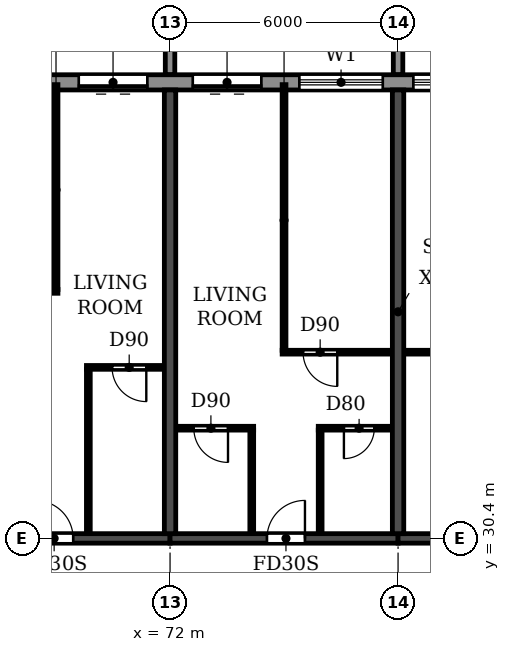
"""IFC4 building model, lengths in metres.
Left out: names, types, materials, properties, quantities, classifications, styles, units other than length and angle.
Written with IfcOpenShell. Run it as: python <this file> out.ifc"""

import sys

from ifc_helpers import new_model, si_unit, direction, frame, frame_2d, origin, place, context, subcontext, project, spatial, polyline, rectangle, outline, extrude, source, transform, mapped, element, fill, save


model = new_model("IFC4")
c1 = context("Model", 3, precision=1e-05, world=origin(), true_north=direction((0.0, 1.0)))
c2 = subcontext(c1, "Body", "Model", "MODEL_VIEW")
j1 = project(units=[si_unit("LENGTHUNIT", "METRE"), si_unit("PLANEANGLEUNIT", "RADIAN")], contexts=[c1])
p1 = place(None, origin())
s1 = spatial("IfcSite", under=j1, at=p1, CompositionType="ELEMENT")
p2 = place(p1, origin())
s2 = spatial("IfcBuilding", under=s1, at=p2, CompositionType="ELEMENT")
p3 = place(p2, frame((0.0, 0.0, 142.2)))
s3 = spatial("IfcBuildingStorey", under=s2, at=p3, CompositionType="ELEMENT", Elevation=142.2)
for number, where, z_axis, x_axis in (
    (1, (72.0, 30.525, 0.0), (0.0, 0.0, 1.0), (0.0, 1.0, 0.0)),
    (2, (78.0, 30.525, 0.0), (0.0, 0.0, 1.0), (0.0, 1.0, 0.0)),
):
    element("IfcWall", number, at=place(p3, frame(where, z_axis=z_axis, x_axis=x_axis)), inside=s3, PredefinedType="SHEAR", context=c2, shape_type="SweptSolid", body=[
        extrude(rectangle(XDim=11.675, YDim=0.3, at=frame_2d((5.837, 0.0))), origin(), (0.0, 0.0, 1.0), 3.07),
    ])
p4 = place(p3, frame((66.0, 30.4, 0.0), z_axis=(0.0, 0.0, 1.0), x_axis=(1.0, 0.0, 0.0)))
e3 = element("IfcWall", 3, at=p4, inside=s3, PredefinedType="SHEAR", context=c2, shape_type="SweptSolid", body=[
    extrude(rectangle(XDim=6.0, YDim=0.25, at=frame_2d((3.0, 0.0))), origin(), (0.0, 0.0, 1.0), 2.47),
])
p5 = place(p4, frame((2.45, 0.0, 0.0)))
e4 = element("IfcOpeningElement", 4, at=p5, cuts=e3, PredefinedType="OPENING", context=c2, shape_type="SweptSolid", body=[
    extrude(rectangle(XDim=1.0, YDim=2.1, at=frame_2d((0.5, 1.05))), frame((0.0, 0.135, 0.0), z_axis=(0.0, -1.0, 0.0), x_axis=(1.0, 0.0, 0.0)), (0.0, 0.0, 1.0), 0.27),
])
p6 = place(p3, frame((72.0, 30.4, 0.0), z_axis=(0.0, 0.0, 1.0), x_axis=(1.0, 0.0, 0.0)))
e5 = element("IfcWall", 5, at=p6, inside=s3, PredefinedType="SHEAR", context=c2, shape_type="SweptSolid", body=[
    extrude(rectangle(XDim=6.0, YDim=0.25, at=frame_2d((3.0, 0.0))), origin(), (0.0, 0.0, 1.0), 2.47),
])
p7 = place(p6, frame((2.55, 0.0, 0.0)))
e6 = element("IfcOpeningElement", 6, at=p7, cuts=e5, PredefinedType="OPENING", context=c2, shape_type="SweptSolid", body=[
    extrude(rectangle(XDim=1.0, YDim=2.1, at=frame_2d((0.5, 1.05))), frame((0.0, 0.135, 0.0), z_axis=(0.0, -1.0, 0.0), x_axis=(1.0, 0.0, 0.0)), (0.0, 0.0, 1.0), 0.27),
])
p8 = place(p3, frame((78.0, 30.4, 0.0), z_axis=(0.0, 0.0, 1.0), x_axis=(1.0, 0.0, 0.0)))
e7 = element("IfcWall", 7, at=p8, inside=s3, PredefinedType="SHEAR", context=c2, shape_type="SweptSolid", body=[
    extrude(rectangle(XDim=6.0, YDim=0.25, at=frame_2d((3.0, 0.0))), origin(), (0.0, 0.0, 1.0), 2.47),
])
p9 = place(p8, frame((2.55, 0.0, 0.0)))
e8 = element("IfcOpeningElement", 8, at=p9, cuts=e7, PredefinedType="OPENING", context=c2, shape_type="SweptSolid", body=[
    extrude(rectangle(XDim=1.0, YDim=2.1, at=frame_2d((0.5, 1.05))), frame((0.0, 0.135, 0.0), z_axis=(0.0, -1.0, 0.0), x_axis=(1.0, 0.0, 0.0)), (0.0, 0.0, 1.0), 0.27),
])
p10 = place(p3, frame((85.317, 42.4, 0.0), z_axis=(0.0, 0.0, 1.0), x_axis=(-1.0, 0.0, 0.0)))
e9 = element("IfcWall", 9, at=p10, inside=s3, PredefinedType="STANDARD", context=c2, shape_type="SweptSolid", body=[
    extrude(rectangle(XDim=68.634, YDim=0.4, at=frame_2d((34.317, 0.0))), origin(), (0.0, 0.0, 1.0), 3.07),
])
p11 = place(p10, frame((64.717, 0.0, 0.9)))
e10 = element("IfcOpeningElement", 10, at=p11, cuts=e9, PredefinedType="OPENING", context=c2, shape_type="SweptSolid", body=[
    extrude(rectangle(XDim=2.2, YDim=1.5, at=frame_2d((1.1, 0.75))), frame((0.0, 0.21, 0.0), z_axis=(0.0, -1.0, 0.0), x_axis=(1.0, 0.0, 0.0)), (0.0, 0.0, 1.0), 0.42),
])
p12 = place(p10, frame((61.917, 0.0, 0.0)))
e11 = element("IfcOpeningElement", 11, at=p12, cuts=e9, PredefinedType="OPENING", context=c2, shape_type="SweptSolid", body=[
    extrude(rectangle(XDim=1.8, YDim=2.4, at=frame_2d((0.9, 1.2))), frame((0.0, 0.21, 0.0), z_axis=(0.0, -1.0, 0.0), x_axis=(1.0, 0.0, 0.0)), (0.0, 0.0, 1.0), 0.42),
])
p13 = place(p10, frame((58.717, 0.0, 0.9)))
e12 = element("IfcOpeningElement", 12, at=p13, cuts=e9, PredefinedType="OPENING", context=c2, shape_type="SweptSolid", body=[
    extrude(rectangle(XDim=2.2, YDim=1.5, at=frame_2d((1.1, 0.75))), frame((0.0, 0.21, 0.0), z_axis=(0.0, -1.0, 0.0), x_axis=(1.0, 0.0, 0.0)), (0.0, 0.0, 1.0), 0.42),
])
p14 = place(p10, frame((55.917, 0.0, 0.0)))
e13 = element("IfcOpeningElement", 13, at=p14, cuts=e9, PredefinedType="OPENING", context=c2, shape_type="SweptSolid", body=[
    extrude(rectangle(XDim=1.8, YDim=2.4, at=frame_2d((0.9, 1.2))), frame((0.0, 0.21, 0.0), z_axis=(0.0, -1.0, 0.0), x_axis=(1.0, 0.0, 0.0)), (0.0, 0.0, 1.0), 0.42),
])
p15 = place(p10, frame((52.717, 0.0, 0.9)))
e14 = element("IfcOpeningElement", 14, at=p15, cuts=e9, PredefinedType="OPENING", context=c2, shape_type="SweptSolid", body=[
    extrude(rectangle(XDim=2.2, YDim=1.5, at=frame_2d((1.1, 0.75))), frame((0.0, 0.21, 0.0), z_axis=(0.0, -1.0, 0.0), x_axis=(1.0, 0.0, 0.0)), (0.0, 0.0, 1.0), 0.42),
])
p16 = place(p10, frame((49.717, 0.0, 0.9)))
e15 = element("IfcOpeningElement", 15, at=p16, cuts=e9, PredefinedType="OPENING", context=c2, shape_type="SweptSolid", body=[
    extrude(rectangle(XDim=2.2, YDim=1.5, at=frame_2d((1.1, 0.75))), frame((0.0, 0.21, 0.0), z_axis=(0.0, -1.0, 0.0), x_axis=(1.0, 0.0, 0.0)), (0.0, 0.0, 1.0), 0.42),
])
p17 = place(p10, frame((46.917, 0.0, 0.0)))
e16 = element("IfcOpeningElement", 16, at=p17, cuts=e9, PredefinedType="OPENING", context=c2, shape_type="SweptSolid", body=[
    extrude(rectangle(XDim=1.8, YDim=2.4, at=frame_2d((0.9, 1.2))), frame((0.0, 0.21, 0.0), z_axis=(0.0, -1.0, 0.0), x_axis=(1.0, 0.0, 0.0)), (0.0, 0.0, 1.0), 0.42),
])
p18 = place(p10, frame((43.717, 0.0, 0.9)))
e17 = element("IfcOpeningElement", 17, at=p18, cuts=e9, PredefinedType="OPENING", context=c2, shape_type="SweptSolid", body=[
    extrude(rectangle(XDim=2.2, YDim=1.5, at=frame_2d((1.1, 0.75))), frame((0.0, 0.21, 0.0), z_axis=(0.0, -1.0, 0.0), x_axis=(1.0, 0.0, 0.0)), (0.0, 0.0, 1.0), 0.42),
])
p19 = place(p10, frame((40.717, 0.0, 0.9)))
e18 = element("IfcOpeningElement", 18, at=p19, cuts=e9, PredefinedType="OPENING", context=c2, shape_type="SweptSolid", body=[
    extrude(rectangle(XDim=2.2, YDim=1.5, at=frame_2d((1.1, 0.75))), frame((0.0, 0.21, 0.0), z_axis=(0.0, -1.0, 0.0), x_axis=(1.0, 0.0, 0.0)), (0.0, 0.0, 1.0), 0.42),
])
p20 = place(p10, frame((37.717, 0.0, 0.9)))
e19 = element("IfcOpeningElement", 19, at=p20, cuts=e9, PredefinedType="OPENING", context=c2, shape_type="SweptSolid", body=[
    extrude(rectangle(XDim=2.2, YDim=1.5, at=frame_2d((1.1, 0.75))), frame((0.0, 0.21, 0.0), z_axis=(0.0, -1.0, 0.0), x_axis=(1.0, 0.0, 0.0)), (0.0, 0.0, 1.0), 0.42),
])
p21 = place(p10, frame((34.717, 0.0, 0.9)))
e20 = element("IfcOpeningElement", 20, at=p21, cuts=e9, PredefinedType="OPENING", context=c2, shape_type="SweptSolid", body=[
    extrude(rectangle(XDim=2.2, YDim=1.5, at=frame_2d((1.1, 0.75))), frame((0.0, 0.21, 0.0), z_axis=(0.0, -1.0, 0.0), x_axis=(1.0, 0.0, 0.0)), (0.0, 0.0, 1.0), 0.42),
])
p22 = place(p10, frame((31.917, 0.0, 0.0)))
e21 = element("IfcOpeningElement", 21, at=p22, cuts=e9, PredefinedType="OPENING", context=c2, shape_type="SweptSolid", body=[
    extrude(rectangle(XDim=1.8, YDim=2.4, at=frame_2d((0.9, 1.2))), frame((0.0, 0.21, 0.0), z_axis=(0.0, -1.0, 0.0), x_axis=(1.0, 0.0, 0.0)), (0.0, 0.0, 1.0), 0.42),
])
p23 = place(p10, frame((28.917, 0.0, 0.0)))
e22 = element("IfcOpeningElement", 22, at=p23, cuts=e9, PredefinedType="OPENING", context=c2, shape_type="SweptSolid", body=[
    extrude(rectangle(XDim=1.8, YDim=2.4, at=frame_2d((0.9, 1.2))), frame((0.0, 0.21, 0.0), z_axis=(0.0, -1.0, 0.0), x_axis=(1.0, 0.0, 0.0)), (0.0, 0.0, 1.0), 0.42),
])
p24 = place(p10, frame((25.717, 0.0, 0.9)))
e23 = element("IfcOpeningElement", 23, at=p24, cuts=e9, PredefinedType="OPENING", context=c2, shape_type="SweptSolid", body=[
    extrude(rectangle(XDim=2.2, YDim=1.5, at=frame_2d((1.1, 0.75))), frame((0.0, 0.21, 0.0), z_axis=(0.0, -1.0, 0.0), x_axis=(1.0, 0.0, 0.0)), (0.0, 0.0, 1.0), 0.42),
])
p25 = place(p10, frame((22.717, 0.0, 0.9)))
e24 = element("IfcOpeningElement", 24, at=p25, cuts=e9, PredefinedType="OPENING", context=c2, shape_type="SweptSolid", body=[
    extrude(rectangle(XDim=2.2, YDim=1.5, at=frame_2d((1.1, 0.75))), frame((0.0, 0.21, 0.0), z_axis=(0.0, -1.0, 0.0), x_axis=(1.0, 0.0, 0.0)), (0.0, 0.0, 1.0), 0.42),
])
p26 = place(p10, frame((19.717, 0.0, 0.9)))
e25 = element("IfcOpeningElement", 25, at=p26, cuts=e9, PredefinedType="OPENING", context=c2, shape_type="SweptSolid", body=[
    extrude(rectangle(XDim=2.2, YDim=1.5, at=frame_2d((1.1, 0.75))), frame((0.0, 0.21, 0.0), z_axis=(0.0, -1.0, 0.0), x_axis=(1.0, 0.0, 0.0)), (0.0, 0.0, 1.0), 0.42),
])
p27 = place(p10, frame((16.717, 0.0, 0.9)))
e26 = element("IfcOpeningElement", 26, at=p27, cuts=e9, PredefinedType="OPENING", context=c2, shape_type="SweptSolid", body=[
    extrude(rectangle(XDim=2.2, YDim=1.5, at=frame_2d((1.1, 0.75))), frame((0.0, 0.21, 0.0), z_axis=(0.0, -1.0, 0.0), x_axis=(1.0, 0.0, 0.0)), (0.0, 0.0, 1.0), 0.42),
])
p28 = place(p10, frame((13.917, 0.0, 0.0)))
e27 = element("IfcOpeningElement", 27, at=p28, cuts=e9, PredefinedType="OPENING", context=c2, shape_type="SweptSolid", body=[
    extrude(rectangle(XDim=1.8, YDim=2.4, at=frame_2d((0.9, 1.2))), frame((0.0, 0.21, 0.0), z_axis=(0.0, -1.0, 0.0), x_axis=(1.0, 0.0, 0.0)), (0.0, 0.0, 1.0), 0.42),
])
p29 = place(p10, frame((10.917, 0.0, 0.0)))
e28 = element("IfcOpeningElement", 28, at=p29, cuts=e9, PredefinedType="OPENING", context=c2, shape_type="SweptSolid", body=[
    extrude(rectangle(XDim=1.8, YDim=2.4, at=frame_2d((0.9, 1.2))), frame((0.0, 0.21, 0.0), z_axis=(0.0, -1.0, 0.0), x_axis=(1.0, 0.0, 0.0)), (0.0, 0.0, 1.0), 0.42),
])
p30 = place(p10, frame((7.717, 0.0, 0.9)))
e29 = element("IfcOpeningElement", 29, at=p30, cuts=e9, PredefinedType="OPENING", context=c2, shape_type="SweptSolid", body=[
    extrude(rectangle(XDim=2.2, YDim=1.5, at=frame_2d((1.1, 0.75))), frame((0.0, 0.21, 0.0), z_axis=(0.0, -1.0, 0.0), x_axis=(1.0, 0.0, 0.0)), (0.0, 0.0, 1.0), 0.42),
])
p31 = place(p10, frame((4.717, 0.0, 0.9)))
e30 = element("IfcOpeningElement", 30, at=p31, cuts=e9, PredefinedType="OPENING", context=c2, shape_type="SweptSolid", body=[
    extrude(rectangle(XDim=2.2, YDim=1.5, at=frame_2d((1.1, 0.75))), frame((0.0, 0.21, 0.0), z_axis=(0.0, -1.0, 0.0), x_axis=(1.0, 0.0, 0.0)), (0.0, 0.0, 1.0), 0.42),
])
p32 = place(p10, frame((1.917, 0.0, 0.0)))
e31 = element("IfcOpeningElement", 31, at=p32, cuts=e9, PredefinedType="OPENING", context=c2, shape_type="SweptSolid", body=[
    extrude(rectangle(XDim=1.8, YDim=2.4, at=frame_2d((0.9, 1.2))), frame((0.0, 0.21, 0.0), z_axis=(0.0, -1.0, 0.0), x_axis=(1.0, 0.0, 0.0)), (0.0, 0.0, 1.0), 0.42),
])
m1 = source(origin(), c2, "Body", "SweptSolid", [
    extrude(outline(polyline([(0.0, 0.0), (0.25, 0.0), (0.25, 3.1), (0.0, 3.1), (0.0, 0.0)])), origin(), (0.0, 0.0, 1.0), 3.1),
])
for number, where in (
    (32, (71.875, 42.6, 0.0)),
    (33, (77.875, 42.6, 0.0)),
):
    element("IfcWall", number, at=place(p3, frame(where)), inside=s3, PredefinedType="STANDARD", context=c2, shape_type="MappedRepresentation", body=[
        mapped(m1, transform((0.0, 0.0, 0.0))),
    ])
p33 = place(p3, frame((72.16, 33.3, 0.0), z_axis=(0.0, 0.0, 1.0), x_axis=(1.0, 0.0, 0.0)))
e34 = element("IfcWall", 34, at=p33, inside=s3, PredefinedType="PARTITIONING", context=c2, shape_type="SweptSolid", body=[
    extrude(rectangle(XDim=2.04, YDim=0.1, at=frame_2d((1.02, 0.0))), origin(), (0.0, 0.0, 1.0), 3.07),
])
p34 = place(p33, frame((0.465, 0.0, 0.0)))
e35 = element("IfcOpeningElement", 35, at=p34, cuts=e34, PredefinedType="OPENING", context=c2, shape_type="SweptSolid", body=[
    extrude(rectangle(XDim=0.9, YDim=2.1, at=frame_2d((0.45, 1.05))), frame((0.0, 0.06, 0.0), z_axis=(0.0, -1.0, 0.0), x_axis=(1.0, 0.0, 0.0)), (0.0, 0.0, 1.0), 0.12),
])
p35 = place(p3, frame((75.9, 33.3, 0.0), z_axis=(0.0, 0.0, 1.0), x_axis=(1.0, 0.0, 0.0)))
e36 = element("IfcWall", 36, at=p35, inside=s3, PredefinedType="PARTITIONING", context=c2, shape_type="SweptSolid", body=[
    extrude(rectangle(XDim=1.94, YDim=0.1, at=frame_2d((0.97, 0.0))), origin(), (0.0, 0.0, 1.0), 3.07),
])
p36 = place(p35, frame((0.675, 0.0, 0.0)))
e37 = element("IfcOpeningElement", 37, at=p36, cuts=e36, PredefinedType="OPENING", context=c2, shape_type="SweptSolid", body=[
    extrude(rectangle(XDim=0.8, YDim=2.1, at=frame_2d((0.4, 1.05))), frame((0.0, 0.06, 0.0), z_axis=(0.0, -1.0, 0.0), x_axis=(1.0, 0.0, 0.0)), (0.0, 0.0, 1.0), 0.12),
])
p37 = place(p3, frame((69.8, 34.9, 0.0), z_axis=(0.0, 0.0, 1.0), x_axis=(1.0, 0.0, 0.0)))
e38 = element("IfcWall", 38, at=p37, inside=s3, PredefinedType="PARTITIONING", context=c2, shape_type="SweptSolid", body=[
    extrude(rectangle(XDim=2.04, YDim=0.1, at=frame_2d((1.02, 0.0))), origin(), (0.0, 0.0, 1.0), 3.07),
])
p38 = place(p37, frame((0.675, 0.0, 0.0)))
e39 = element("IfcOpeningElement", 39, at=p38, cuts=e38, PredefinedType="OPENING", context=c2, shape_type="SweptSolid", body=[
    extrude(rectangle(XDim=0.9, YDim=2.1, at=frame_2d((0.45, 1.05))), frame((0.0, 0.06, 0.0), z_axis=(0.0, -1.0, 0.0), x_axis=(1.0, 0.0, 0.0)), (0.0, 0.0, 1.0), 0.12),
])
p39 = place(p3, frame((74.95, 35.3, 0.0), z_axis=(0.0, 0.0, 1.0), x_axis=(1.0, 0.0, 0.0)))
e40 = element("IfcWall", 40, at=p39, inside=s3, PredefinedType="PARTITIONING", context=c2, shape_type="SweptSolid", body=[
    extrude(rectangle(XDim=2.89, YDim=0.1, at=frame_2d((1.445, 0.0))), origin(), (0.0, 0.0, 1.0), 3.07),
])
p40 = place(p39, frame((0.55, 0.0, 0.0)))
e41 = element("IfcOpeningElement", 41, at=p40, cuts=e40, PredefinedType="OPENING", context=c2, shape_type="SweptSolid", body=[
    extrude(rectangle(XDim=0.9, YDim=2.1, at=frame_2d((0.45, 1.05))), frame((0.0, 0.06, 0.0), z_axis=(0.0, -1.0, 0.0), x_axis=(1.0, 0.0, 0.0)), (0.0, 0.0, 1.0), 0.12),
])
p41 = place(p3, frame((78.16, 35.3, 0.0), z_axis=(0.0, 0.0, 1.0), x_axis=(1.0, 0.0, 0.0)))
e42 = element("IfcWall", 42, at=p41, inside=s3, PredefinedType="PARTITIONING", context=c2, shape_type="SweptSolid", body=[
    extrude(rectangle(XDim=2.04, YDim=0.1, at=frame_2d((1.02, 0.0))), origin(), (0.0, 0.0, 1.0), 3.07),
])
p42 = place(p3, frame((66.16, 36.9, 0.0), z_axis=(0.0, 0.0, 1.0), x_axis=(1.0, 0.0, 0.0)))
e43 = element("IfcWall", 43, at=p42, inside=s3, PredefinedType="PARTITIONING", context=c2, shape_type="SweptSolid", body=[
    extrude(rectangle(XDim=2.89, YDim=0.1, at=frame_2d((1.445, 0.0))), origin(), (0.0, 0.0, 1.0), 3.07),
])
p43 = place(p42, frame((0.34, 0.0, 0.0)))
e44 = element("IfcOpeningElement", 44, at=p43, cuts=e43, PredefinedType="OPENING", context=c2, shape_type="SweptSolid", body=[
    extrude(rectangle(XDim=0.9, YDim=2.1, at=frame_2d((0.45, 1.05))), frame((0.0, 0.06, 0.0), z_axis=(0.0, -1.0, 0.0), x_axis=(1.0, 0.0, 0.0)), (0.0, 0.0, 1.0), 0.12),
])
p44 = place(p3, frame((69.0, 36.95, 0.0), z_axis=(0.0, 0.0, 1.0), x_axis=(0.0, 1.0, 0.0)))
e45 = element("IfcWall", 45, at=p44, inside=s3, PredefinedType="PARTITIONING", context=c2, shape_type="SweptSolid", body=[
    extrude(rectangle(XDim=5.39, YDim=0.1, at=frame_2d((2.695, 0.0))), origin(), (0.0, 0.0, 1.0), 3.07),
])
p45 = place(p3, frame((69.85, 30.535, 0.0), z_axis=(0.0, 0.0, 1.0), x_axis=(0.0, 1.0, 0.0)))
e46 = element("IfcWall", 46, at=p45, inside=s3, PredefinedType="PARTITIONING", context=c2, shape_type="SweptSolid", body=[
    extrude(rectangle(XDim=4.315, YDim=0.1, at=frame_2d((2.158, 0.0))), origin(), (0.0, 0.0, 1.0), 3.07),
])
p46 = place(p3, frame((74.15, 30.535, 0.0), z_axis=(0.0, 0.0, 1.0), x_axis=(0.0, 1.0, 0.0)))
e47 = element("IfcWall", 47, at=p46, inside=s3, PredefinedType="PARTITIONING", context=c2, shape_type="SweptSolid", body=[
    extrude(rectangle(XDim=2.715, YDim=0.1, at=frame_2d((1.357, 0.0))), origin(), (0.0, 0.0, 1.0), 3.07),
])
p47 = place(p3, frame((75.0, 35.35, 0.0), z_axis=(0.0, 0.0, 1.0), x_axis=(0.0, 1.0, 0.0)))
e48 = element("IfcWall", 48, at=p47, inside=s3, PredefinedType="PARTITIONING", context=c2, shape_type="SweptSolid", body=[
    extrude(rectangle(XDim=6.99, YDim=0.1, at=frame_2d((3.495, 0.0))), origin(), (0.0, 0.0, 1.0), 3.07),
])
p48 = place(p3, frame((75.95, 30.535, 0.0), z_axis=(0.0, 0.0, 1.0), x_axis=(0.0, 1.0, 0.0)))
e49 = element("IfcWall", 49, at=p48, inside=s3, PredefinedType="PARTITIONING", context=c2, shape_type="SweptSolid", body=[
    extrude(rectangle(XDim=2.715, YDim=0.1, at=frame_2d((1.357, 0.0))), origin(), (0.0, 0.0, 1.0), 3.07),
])
p49 = place(p28, origin())
e50 = element("IfcDoor", 50, at=p49, inside=s3, OperationType="DOUBLE_DOOR_SLIDING", PredefinedType="DOOR", context=c2, shape_type="SweptSolid", body=[
    extrude(rectangle(XDim=1.8, YDim=2.4, at=frame_2d((0.9, 1.2))), frame((0.0, 0.025, 0.0), z_axis=(0.0, -1.0, 0.0), x_axis=(1.0, 0.0, 0.0)), (0.0, 0.0, 1.0), 0.05),
])
fill(e27, e50)
p50 = place(p29, origin())
e51 = element("IfcDoor", 51, at=p50, inside=s3, OperationType="DOUBLE_DOOR_SLIDING", PredefinedType="DOOR", context=c2, shape_type="SweptSolid", body=[
    extrude(rectangle(XDim=1.8, YDim=2.4, at=frame_2d((0.9, 1.2))), frame((0.0, 0.025, 0.0), z_axis=(0.0, -1.0, 0.0), x_axis=(1.0, 0.0, 0.0)), (0.0, 0.0, 1.0), 0.05),
])
fill(e28, e51)
p51 = place(p30, origin())
e52 = element("IfcWindow", 52, at=p51, inside=s3, PartitioningType="DOUBLE_PANEL_HORIZONTAL", PredefinedType="WINDOW", context=c2, shape_type="SweptSolid", body=[
    extrude(rectangle(XDim=2.2, YDim=1.5, at=frame_2d((1.1, 0.75))), frame((0.0, 0.03, 0.0), z_axis=(0.0, -1.0, 0.0), x_axis=(1.0, 0.0, 0.0)), (0.0, 0.0, 1.0), 0.06),
])
fill(e29, e52)
p52 = place(p31, origin())
e53 = element("IfcWindow", 53, at=p52, inside=s3, PartitioningType="DOUBLE_PANEL_HORIZONTAL", PredefinedType="WINDOW", context=c2, shape_type="SweptSolid", body=[
    extrude(rectangle(XDim=2.2, YDim=1.5, at=frame_2d((1.1, 0.75))), frame((0.0, 0.03, 0.0), z_axis=(0.0, -1.0, 0.0), x_axis=(1.0, 0.0, 0.0)), (0.0, 0.0, 1.0), 0.06),
])
fill(e30, e53)
p53 = place(p5, origin())
e54 = element("IfcDoor", 54, at=p53, inside=s3, OperationType="SINGLE_SWING_LEFT", PredefinedType="DOOR", context=c2, shape_type="SweptSolid", body=[
    extrude(rectangle(XDim=1.0, YDim=2.1, at=frame_2d((0.5, 1.05))), frame((0.0, 0.025, 0.0), z_axis=(0.0, -1.0, 0.0), x_axis=(1.0, 0.0, 0.0)), (0.0, 0.0, 1.0), 0.05),
])
fill(e4, e54)
p54 = place(p38, frame((0.9, 0.0, 0.0), z_axis=(0.0, 0.0, 1.0), x_axis=(-1.0, 0.0, 0.0)))
e55 = element("IfcDoor", 55, at=p54, inside=s3, OperationType="SINGLE_SWING_LEFT", PredefinedType="DOOR", context=c2, shape_type="SweptSolid", body=[
    extrude(rectangle(XDim=0.9, YDim=2.1, at=frame_2d((0.45, 1.05))), frame((0.0, 0.025, 0.0), z_axis=(0.0, -1.0, 0.0), x_axis=(1.0, 0.0, 0.0)), (0.0, 0.0, 1.0), 0.05),
])
fill(e39, e55)
p55 = place(p34, frame((0.9, 0.0, 0.0), z_axis=(0.0, 0.0, 1.0), x_axis=(-1.0, 0.0, 0.0)))
e56 = element("IfcDoor", 56, at=p55, inside=s3, OperationType="SINGLE_SWING_LEFT", PredefinedType="DOOR", context=c2, shape_type="SweptSolid", body=[
    extrude(rectangle(XDim=0.9, YDim=2.1, at=frame_2d((0.45, 1.05))), frame((0.0, 0.025, 0.0), z_axis=(0.0, -1.0, 0.0), x_axis=(1.0, 0.0, 0.0)), (0.0, 0.0, 1.0), 0.05),
])
fill(e35, e56)
p56 = place(p7, origin())
e57 = element("IfcDoor", 57, at=p56, inside=s3, OperationType="SINGLE_SWING_RIGHT", PredefinedType="DOOR", context=c2, shape_type="SweptSolid", body=[
    extrude(rectangle(XDim=1.0, YDim=2.1, at=frame_2d((0.5, 1.05))), frame((0.0, 0.025, 0.0), z_axis=(0.0, -1.0, 0.0), x_axis=(1.0, 0.0, 0.0)), (0.0, 0.0, 1.0), 0.05),
])
fill(e6, e57)
p57 = place(p40, frame((0.9, 0.0, 0.0), z_axis=(0.0, 0.0, 1.0), x_axis=(-1.0, 0.0, 0.0)))
e58 = element("IfcDoor", 58, at=p57, inside=s3, OperationType="SINGLE_SWING_LEFT", PredefinedType="DOOR", context=c2, shape_type="SweptSolid", body=[
    extrude(rectangle(XDim=0.9, YDim=2.1, at=frame_2d((0.45, 1.05))), frame((0.0, 0.025, 0.0), z_axis=(0.0, -1.0, 0.0), x_axis=(1.0, 0.0, 0.0)), (0.0, 0.0, 1.0), 0.05),
])
fill(e41, e58)
p58 = place(p36, frame((0.8, 0.0, 0.0), z_axis=(0.0, 0.0, 1.0), x_axis=(-1.0, 0.0, 0.0)))
e59 = element("IfcDoor", 59, at=p58, inside=s3, OperationType="SINGLE_SWING_RIGHT", PredefinedType="DOOR", context=c2, shape_type="SweptSolid", body=[
    extrude(rectangle(XDim=0.8, YDim=2.1, at=frame_2d((0.4, 1.05))), frame((0.0, 0.025, 0.0), z_axis=(0.0, -1.0, 0.0), x_axis=(1.0, 0.0, 0.0)), (0.0, 0.0, 1.0), 0.05),
])
fill(e37, e59)
save(model, sys.argv[1])
